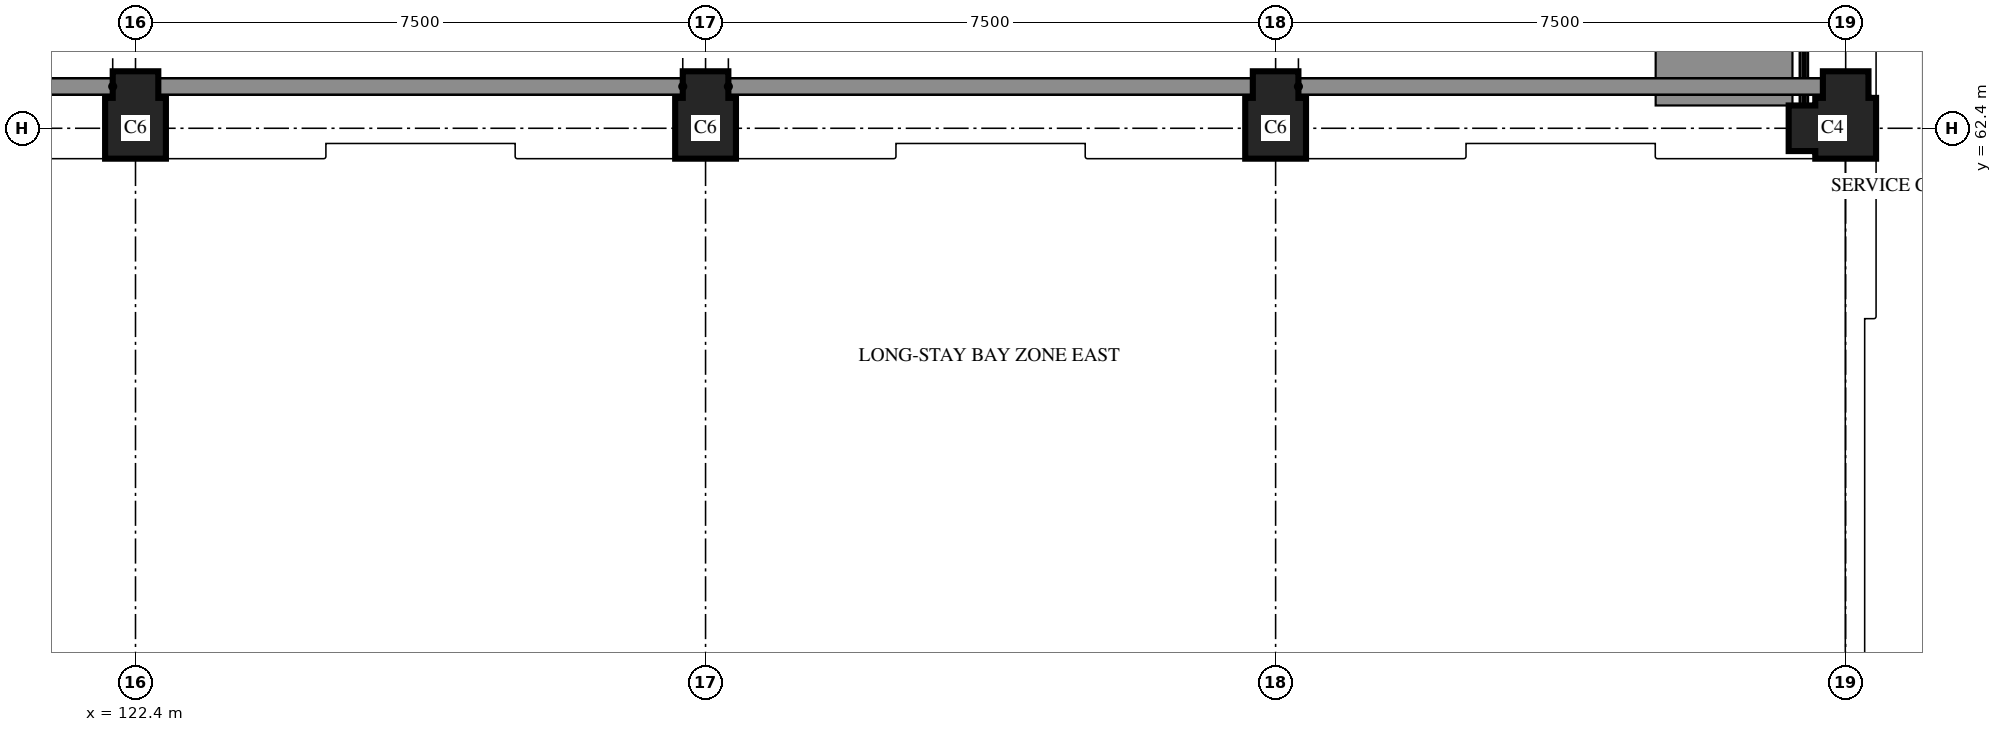
"""IFC4 building model, lengths in metres.
Left out: names, types, materials, properties, quantities, classifications, styles, units other than length and angle.
Written with IfcOpenShell. Run it as: python <this file> out.ifc"""

import sys

from ifc_helpers import new_model, si_unit, direction, frame, origin, place, context, subcontext, project, spatial, polyline, outline, extrude, element, save


model = new_model("IFC4")
c1 = context("Model", 3, precision=1e-05, world=origin(), true_north=direction((0.0, 1.0)))
c2 = subcontext(c1, "Body", "Model", "MODEL_VIEW")
j1 = project(units=[si_unit("LENGTHUNIT", "METRE"), si_unit("PLANEANGLEUNIT", "RADIAN")], contexts=[c1])
p1 = place(None, origin())
s1 = spatial("IfcSite", under=j1, at=p1, CompositionType="ELEMENT")
p2 = place(p1, origin())
s2 = spatial("IfcBuilding", under=s1, at=p2, CompositionType="ELEMENT")
p3 = place(p2, frame((0.0, 0.0, 15.6)))
s3 = spatial("IfcBuildingStorey", under=s2, at=p3, CompositionType="ELEMENT", Elevation=15.6)
for number, where, z_axis, x_axis in (
    (1, (122.4, 62.4, 0.0), (0.0, 0.0, 1.0), (0.0, 1.0, 0.0)),
    (2, (129.9, 62.4, 0.0), (0.0, 0.0, 1.0), (0.0, 1.0, 0.0)),
    (3, (137.4, 62.4, 0.0), (0.0, 0.0, 1.0), (0.0, 1.0, 0.0)),
):
    element("IfcColumn", number, at=place(p3, frame(where, z_axis=z_axis, x_axis=x_axis)), inside=s3, PredefinedType="COLUMN", context=c2, shape_type="SweptSolid", body=[
        extrude(outline(polyline([(-0.4, -0.4), (0.4, -0.4), (0.4, -0.3), (0.75, -0.3), (0.75, 0.3), (0.4, 0.3), (0.4, 0.4), (-0.4, 0.4), (-0.4, -0.4)])), origin(), (0.0, 0.0, 1.0), 3.7),
    ])
p4 = place(p3, frame((144.9, 62.4, 0.0), z_axis=(0.0, 0.0, 1.0), x_axis=(0.0, 1.0, 0.0)))
e4 = element("IfcColumn", 4, at=p4, inside=s3, PredefinedType="COLUMN", context=c2, shape_type="SweptSolid", body=[
    extrude(outline(polyline([(-0.4, -0.4), (0.4, -0.4), (0.4, -0.3), (0.75, -0.3), (0.75, 0.3), (0.4, 0.3), (0.4, 0.4), (0.3, 0.4), (0.3, 0.75), (-0.3, 0.75), (-0.3, 0.4), (-0.4, 0.4), (-0.4, -0.4)])), origin(), (0.0, 0.0, 1.0), 3.7),
])
save(model, sys.argv[1])
